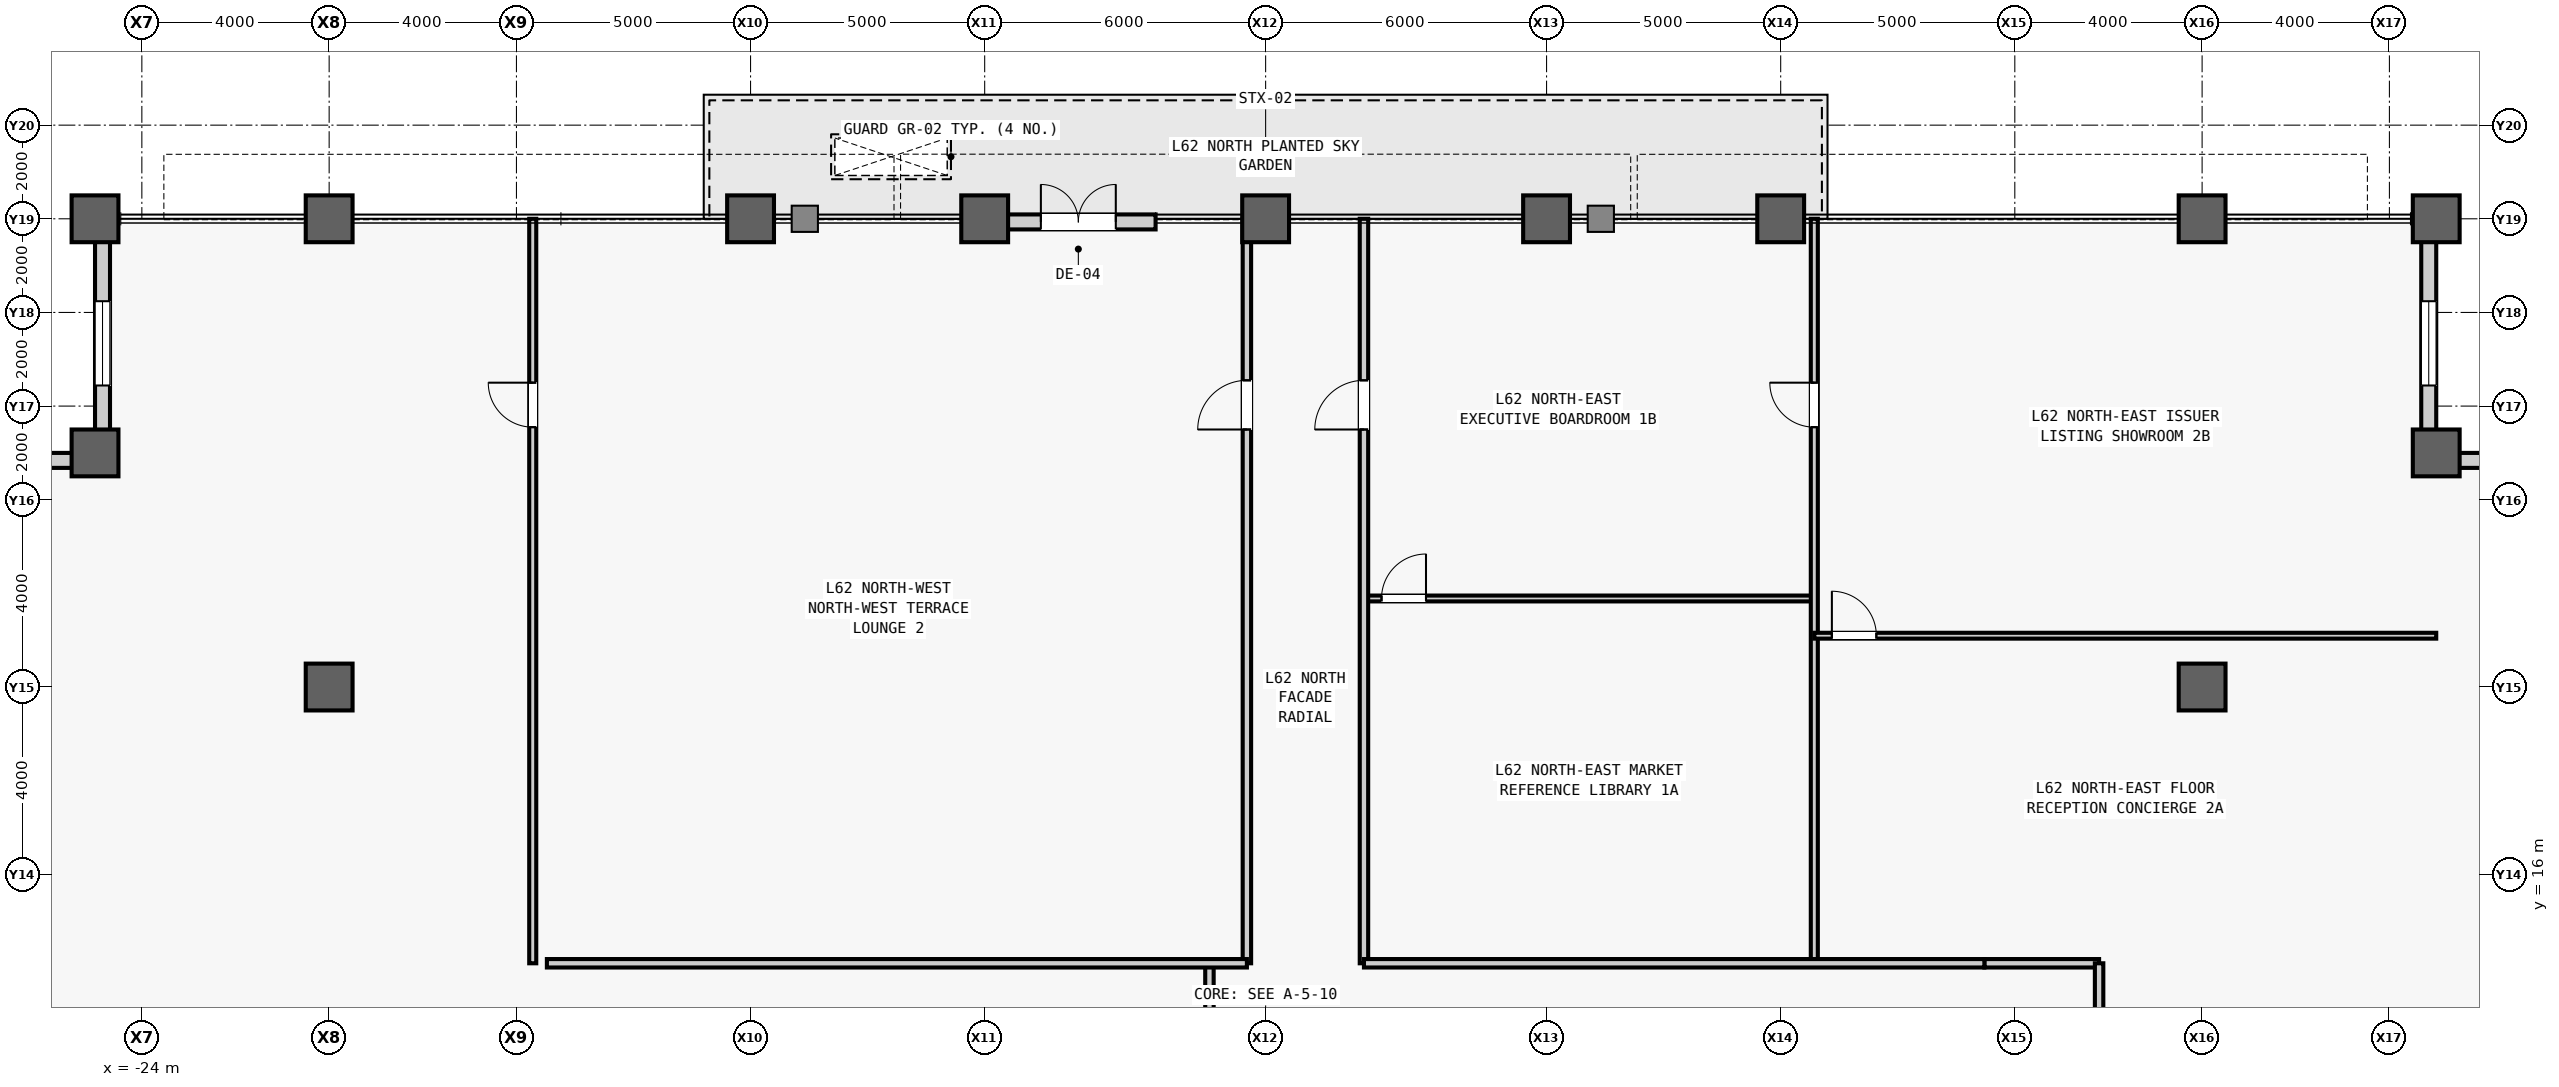
"""IFC4 building model, lengths in metres.
Left out: names, types, materials, properties, quantities, classifications, styles, units other than length and angle.
Written with IfcOpenShell. Run it as: python <this file> out.ifc"""

import sys

from ifc_helpers import new_model, si_unit, direction, frame, frame_2d, origin, origin_2d, place, context, subcontext, project, spatial, rectangle, hollow_rectangle, extrude, source, transform, mapped, element, fill, save


model = new_model("IFC4")
c1 = context("Model", 3, precision=1e-05, world=origin(), true_north=direction((0.0, 1.0)))
c2 = subcontext(c1, "Body", "Model", "MODEL_VIEW")
j1 = project(units=[si_unit("LENGTHUNIT", "METRE"), si_unit("PLANEANGLEUNIT", "RADIAN")], contexts=[c1])
p1 = place(None, origin())
s1 = spatial("IfcSite", under=j1, at=p1, CompositionType="ELEMENT")
p2 = place(p1, origin())
s2 = spatial("IfcBuilding", under=s1, at=p2, CompositionType="ELEMENT")
p3 = place(p2, frame((0.0, 0.0, 263.1)))
s3 = spatial("IfcBuildingStorey", under=s2, at=p3, CompositionType="ELEMENT", Elevation=263.1)
m1 = source(origin(), c2, "Body", "SweptSolid", [
    extrude(hollow_rectangle(XDim=1.0, YDim=1.0, WallThickness=0.055, at=origin_2d()), origin(), (0.0, 0.0, 1.0), 5.2),
])
for number, where, z_axis, x_axis in (
    (1, (-25.0, 25.0, 0.0), (0.0, 0.0, 1.0), (1.0, 0.0, 0.0)),
    (2, (-25.0, 30.0, 0.0), (0.0, 0.0, 1.0), (1.0, 0.0, 0.0)),
    (3, (-20.0, 20.0, 0.0), (0.0, 0.0, 1.0), (1.0, 0.0, 0.0)),
    (4, (-20.0, 30.0, 0.0), (0.0, 0.0, 1.0), (1.0, 0.0, 0.0)),
    (5, (-11.0, 30.0, 0.0), (0.0, 0.0, 1.0), (1.0, 0.0, 0.0)),
    (6, (-6.0, 30.0, 0.0), (0.0, 0.0, 1.0), (1.0, 0.0, 0.0)),
    (7, (0.0, 30.0, 0.0), (0.0, 0.0, 1.0), (1.0, 0.0, 0.0)),
    (8, (6.0, 30.0, 0.0), (0.0, 0.0, 1.0), (1.0, 0.0, 0.0)),
    (9, (11.0, 30.0, 0.0), (0.0, 0.0, 1.0), (1.0, 0.0, 0.0)),
    (10, (20.0, 20.0, 0.0), (0.0, 0.0, 1.0), (1.0, 0.0, 0.0)),
    (11, (20.0, 30.0, 0.0), (0.0, 0.0, 1.0), (1.0, 0.0, 0.0)),
    (12, (25.0, 25.0, 0.0), (0.0, 0.0, 1.0), (1.0, 0.0, 0.0)),
    (13, (25.0, 30.0, 0.0), (0.0, 0.0, 1.0), (1.0, 0.0, 0.0)),
):
    element("IfcColumn", number, at=place(p3, frame(where, z_axis=z_axis, x_axis=x_axis)), inside=s3, PredefinedType="COLUMN", context=c2, shape_type="MappedRepresentation", body=[
        mapped(m1, transform((0.0, 0.0, 0.0), scale=1.0)),
    ])
m2 = source(origin(), c2, "Body", "SweptSolid", [
    extrude(rectangle(XDim=4.68, YDim=0.32, at=frame_2d((2.34, 0.0))), origin(), (0.0, 0.0, 1.0), 3.984),
])
p4 = place(p3, frame((25.0, 24.84, 0.0), z_axis=(0.0, 0.0, 1.0), x_axis=(1.0, 0.0, 0.0)))
e14 = element("IfcWall", 14, at=p4, inside=s3, PredefinedType="STANDARD", context=c2, shape_type="MappedRepresentation", body=[
    mapped(m2, transform((0.0, 0.0, 0.0), scale=1.0)),
])
m3 = source(origin(), c2, "Body", "SweptSolid", [
    extrude(rectangle(XDim=1.8, YDim=2.4, at=frame_2d((0.9, 1.2))), frame((0.0, 0.17, 0.0), z_axis=(0.0, -1.0, 0.0), x_axis=(1.0, 0.0, 0.0)), (0.0, 0.0, 1.0), 0.34),
])
p5 = place(p4, frame((1.44, 0.0, 0.7)))
e15 = element("IfcOpeningElement", 15, at=p5, cuts=e14, PredefinedType="OPENING", context=c2, shape_type="MappedRepresentation", body=[
    mapped(m3, transform((0.0, 0.0, 0.0), scale=1.0)),
])
p6 = place(p3, frame((24.84, 25.0, 0.0), z_axis=(0.0, 0.0, 1.0), x_axis=(0.0, 1.0, 0.0)))
e16 = element("IfcWall", 16, at=p6, inside=s3, PredefinedType="STANDARD", context=c2, shape_type="MappedRepresentation", body=[
    mapped(m2, transform((0.0, 0.0, 0.0), scale=1.0)),
])
p7 = place(p6, frame((1.44, 0.0, 0.7)))
e17 = element("IfcOpeningElement", 17, at=p7, cuts=e16, PredefinedType="OPENING", context=c2, shape_type="MappedRepresentation", body=[
    mapped(m3, transform((0.0, 0.0, 0.0), scale=1.0)),
])
p8 = place(p3, frame((-24.84, 25.0, 0.0), z_axis=(0.0, 0.0, 1.0), x_axis=(0.0, 1.0, 0.0)))
e18 = element("IfcWall", 18, at=p8, inside=s3, PredefinedType="STANDARD", context=c2, shape_type="MappedRepresentation", body=[
    mapped(m2, transform((0.0, 0.0, 0.0), scale=1.0)),
])
p9 = place(p8, frame((1.44, 0.0, 0.7)))
e19 = element("IfcOpeningElement", 19, at=p9, cuts=e18, PredefinedType="OPENING", context=c2, shape_type="MappedRepresentation", body=[
    mapped(m3, transform((0.0, 0.0, 0.0), scale=1.0)),
])
p10 = place(p3, frame((-25.0, 24.84, 0.0), z_axis=(0.0, 0.0, 1.0), x_axis=(-1.0, 0.0, 0.0)))
e20 = element("IfcWall", 20, at=p10, inside=s3, PredefinedType="STANDARD", context=c2, shape_type="MappedRepresentation", body=[
    mapped(m2, transform((0.0, 0.0, 0.0), scale=1.0)),
])
p11 = place(p10, frame((1.44, 0.0, 0.7)))
e21 = element("IfcOpeningElement", 21, at=p11, cuts=e20, PredefinedType="OPENING", context=c2, shape_type="MappedRepresentation", body=[
    mapped(m3, transform((0.0, 0.0, 0.0), scale=1.0)),
])
m4 = source(origin(), c2, "Body", "SweptSolid", [
    extrude(rectangle(XDim=3.3, YDim=0.32, at=frame_2d((1.65, 0.0))), origin(), (0.0, 0.0, 1.0), 3.984),
])
p12 = place(p3, frame((-5.65, 29.933, 0.0), z_axis=(0.0, 0.0, 1.0), x_axis=(1.0, 0.0, 0.0)))
e22 = element("IfcWall", 22, at=p12, inside=s3, PredefinedType="STANDARD", context=c2, shape_type="MappedRepresentation", body=[
    mapped(m4, transform((0.0, 0.0, 0.0), scale=1.0)),
])
m5 = source(origin(), c2, "Body", "SweptSolid", [
    extrude(rectangle(XDim=1.6, YDim=2.25, at=frame_2d((0.8, 1.125))), frame((0.0, 0.17, 0.0), z_axis=(0.0, -1.0, 0.0), x_axis=(1.0, 0.0, 0.0)), (0.0, 0.0, 1.0), 0.34),
])
p13 = place(p12, frame((0.85, 0.0, 0.0)))
e23 = element("IfcOpeningElement", 23, at=p13, cuts=e22, PredefinedType="OPENING", context=c2, shape_type="MappedRepresentation", body=[
    mapped(m5, transform((0.0, 0.0, 0.0), scale=1.0)),
])
m6 = source(origin(), c2, "Body", "SweptSolid", [
    extrude(rectangle(XDim=2.45, YDim=0.18, at=frame_2d((1.225, 0.0))), origin(), (0.0, 0.0, 1.0), 4.6),
])
p14 = place(p3, frame((15.35, 14.1, 0.0), z_axis=(0.0, 0.0, 1.0), x_axis=(1.0, 0.0, 0.0)))
e24 = element("IfcWall", 24, at=p14, inside=s3, PredefinedType="PARTITIONING", context=c2, shape_type="MappedRepresentation", body=[
    mapped(m6, transform((0.0, 0.0, 0.0), scale=1.0)),
])
m7 = source(origin(), c2, "Body", "SweptSolid", [
    extrude(rectangle(XDim=3.1, YDim=0.18, at=frame_2d((1.55, 0.0))), origin(), (0.0, 0.0, 1.0), 4.6),
])
p15 = place(p3, frame((-1.2, 11.0, 0.0), z_axis=(0.0, 0.0, 1.0), x_axis=(0.0, 1.0, 0.0)))
e25 = element("IfcWall", 25, at=p15, inside=s3, PredefinedType="PARTITIONING", context=c2, shape_type="MappedRepresentation", body=[
    mapped(m7, transform((0.0, 0.0, 0.0), scale=1.0)),
])
m8 = source(origin(), c2, "Body", "SweptSolid", [
    extrude(rectangle(XDim=15.9, YDim=0.15, at=frame_2d((7.95, 0.0))), origin(), (0.0, 0.0, 1.0), 4.6),
])
p16 = place(p3, frame((-15.652, 14.1, 0.0), z_axis=(0.0, 0.0, 1.0), x_axis=(0.0, 1.0, 0.0)))
e26 = element("IfcWall", 26, at=p16, inside=s3, PredefinedType="PARTITIONING", context=c2, shape_type="MappedRepresentation", body=[
    mapped(m8, transform((0.0, 0.0, 0.0), scale=1.0)),
])
m9 = source(origin(), c2, "Body", "SweptSolid", [
    extrude(rectangle(XDim=0.95, YDim=2.15, at=frame_2d((0.475, 1.075))), frame((0.0, 0.085, 0.0), z_axis=(0.0, -1.0, 0.0), x_axis=(1.0, 0.0, 0.0)), (0.0, 0.0, 1.0), 0.17),
])
p17 = place(p16, frame((11.45, 0.0, 0.0)))
e27 = element("IfcOpeningElement", 27, at=p17, cuts=e26, PredefinedType="OPENING", context=c2, shape_type="MappedRepresentation", body=[
    mapped(m9, transform((0.0, 0.0, 0.0), scale=1.0)),
])
m10 = source(origin(), c2, "Body", "SweptSolid", [
    extrude(rectangle(XDim=15.9, YDim=0.18, at=frame_2d((7.95, 0.0))), origin(), (0.0, 0.0, 1.0), 2.8),
])
p18 = place(p3, frame((-0.4, 14.1, 0.0), z_axis=(0.0, 0.0, 1.0), x_axis=(0.0, 1.0, 0.0)))
e28 = element("IfcWall", 28, at=p18, inside=s3, PredefinedType="PARTITIONING", context=c2, shape_type="MappedRepresentation", body=[
    mapped(m10, transform((0.0, 0.0, 0.0), scale=1.0)),
])
m11 = source(origin(), c2, "Body", "SweptSolid", [
    extrude(rectangle(XDim=1.05, YDim=2.2, at=frame_2d((0.525, 1.1))), frame((0.0, 0.1, 0.0), z_axis=(0.0, -1.0, 0.0), x_axis=(1.0, 0.0, 0.0)), (0.0, 0.0, 1.0), 0.2),
])
p19 = place(p18, frame((11.4, 0.0, 0.0)))
e29 = element("IfcOpeningElement", 29, at=p19, cuts=e28, PredefinedType="OPENING", context=c2, shape_type="MappedRepresentation", body=[
    mapped(m11, transform((0.0, 0.0, 0.0), scale=1.0)),
])
m12 = source(origin(), c2, "Body", "SweptSolid", [
    extrude(rectangle(XDim=14.95, YDim=0.18, at=frame_2d((7.475, 0.0))), origin(), (0.0, 0.0, 1.0), 4.6),
])
p20 = place(p3, frame((-15.35, 14.1, 0.0), z_axis=(0.0, 0.0, 1.0), x_axis=(1.0, 0.0, 0.0)))
e30 = element("IfcWall", 30, at=p20, inside=s3, PredefinedType="PARTITIONING", context=c2, shape_type="MappedRepresentation", body=[
    mapped(m12, transform((0.0, 0.0, 0.0), scale=1.0)),
])
m13 = source(origin(), c2, "Body", "SweptSolid", [
    extrude(rectangle(XDim=9.618, YDim=0.125, at=frame_2d((4.809, 0.0))), origin(), (0.0, 0.0, 1.0), 4.6),
])
p21 = place(p3, frame((2.1, 21.891, 0.0), z_axis=(0.0, 0.0, 1.0), x_axis=(1.0, 0.0, 0.0)))
e31 = element("IfcWall", 31, at=p21, inside=s3, PredefinedType="PARTITIONING", context=c2, shape_type="MappedRepresentation", body=[
    mapped(m13, transform((0.0, 0.0, 0.0), scale=1.0)),
])
m14 = source(origin(), c2, "Body", "SweptSolid", [
    extrude(rectangle(XDim=0.95, YDim=2.15, at=frame_2d((0.475, 1.075))), frame((0.0, 0.073, 0.0), z_axis=(0.0, -1.0, 0.0), x_axis=(1.0, 0.0, 0.0)), (0.0, 0.0, 1.0), 0.145),
])
p22 = place(p21, frame((0.375, 0.0, 0.0)))
e32 = element("IfcOpeningElement", 32, at=p22, cuts=e31, PredefinedType="OPENING", context=c2, shape_type="MappedRepresentation", body=[
    mapped(m14, transform((0.0, 0.0, 0.0), scale=1.0)),
])
p23 = place(p3, frame((11.718, 14.1, 0.0), z_axis=(0.0, 0.0, 1.0), x_axis=(0.0, 1.0, 0.0)))
e33 = element("IfcWall", 33, at=p23, inside=s3, PredefinedType="PARTITIONING", context=c2, shape_type="MappedRepresentation", body=[
    mapped(m8, transform((0.0, 0.0, 0.0), scale=1.0)),
])
p24 = place(p23, frame((11.45, 0.0, 0.0)))
e34 = element("IfcOpeningElement", 34, at=p24, cuts=e33, PredefinedType="OPENING", context=c2, shape_type="MappedRepresentation", body=[
    mapped(m9, transform((0.0, 0.0, 0.0), scale=1.0)),
])
m15 = source(origin(), c2, "Body", "SweptSolid", [
    extrude(rectangle(XDim=13.282, YDim=0.125, at=frame_2d((6.641, 0.0))), origin(), (0.0, 0.0, 1.0), 4.6),
])
p25 = place(p3, frame((11.718, 21.096, 0.0), z_axis=(0.0, 0.0, 1.0), x_axis=(1.0, 0.0, 0.0)))
e35 = element("IfcWall", 35, at=p25, inside=s3, PredefinedType="PARTITIONING", context=c2, shape_type="MappedRepresentation", body=[
    mapped(m15, transform((0.0, 0.0, 0.0), scale=1.0)),
])
p26 = place(p25, frame((0.375, 0.0, 0.0)))
e36 = element("IfcOpeningElement", 36, at=p26, cuts=e35, PredefinedType="OPENING", context=c2, shape_type="MappedRepresentation", body=[
    mapped(m14, transform((0.0, 0.0, 0.0), scale=1.0)),
])
m16 = source(origin(), c2, "Body", "SweptSolid", [
    extrude(rectangle(XDim=15.9, YDim=0.18, at=frame_2d((7.95, 0.0))), origin(), (0.0, 0.0, 1.0), 4.6),
])
p27 = place(p3, frame((2.1, 14.1, 0.0), z_axis=(0.0, 0.0, 1.0), x_axis=(0.0, 1.0, 0.0)))
e37 = element("IfcWall", 37, at=p27, inside=s3, PredefinedType="PARTITIONING", context=c2, shape_type="MappedRepresentation", body=[
    mapped(m16, transform((0.0, 0.0, 0.0), scale=1.0)),
])
p28 = place(p27, frame((11.4, 0.0, 0.0)))
e38 = element("IfcOpeningElement", 38, at=p28, cuts=e37, PredefinedType="OPENING", context=c2, shape_type="MappedRepresentation", body=[
    mapped(m11, transform((0.0, 0.0, 0.0), scale=1.0)),
])
m17 = source(origin(), c2, "Body", "SweptSolid", [
    extrude(rectangle(XDim=13.25, YDim=0.18, at=frame_2d((6.625, 0.0))), origin(), (0.0, 0.0, 1.0), 4.6),
])
p29 = place(p3, frame((2.1, 14.1, 0.0), z_axis=(0.0, 0.0, 1.0), x_axis=(1.0, 0.0, 0.0)))
e39 = element("IfcWall", 39, at=p29, inside=s3, PredefinedType="PARTITIONING", context=c2, shape_type="MappedRepresentation", body=[
    mapped(m17, transform((0.0, 0.0, 0.0), scale=1.0)),
])
m18 = source(origin(), c2, "Body", "SweptSolid", [
    extrude(rectangle(XDim=16.3, YDim=0.18, at=frame_2d((8.15, 0.0))), origin(), (0.0, 0.0, 1.0), 4.6),
])
p30 = place(p3, frame((17.8, -2.2, 0.0), z_axis=(0.0, 0.0, 1.0), x_axis=(0.0, 1.0, 0.0)))
e40 = element("IfcWall", 40, at=p30, inside=s3, PredefinedType="PARTITIONING", context=c2, shape_type="MappedRepresentation", body=[
    mapped(m18, transform((0.0, 0.0, 0.0), scale=1.0)),
])
m19 = source(origin(), c2, "Body", "SweptSolid", [
    extrude(rectangle(XDim=1.8, YDim=2.4, at=frame_2d((0.9, 1.2))), frame((0.0, 0.03, 0.0), z_axis=(0.0, -1.0, 0.0), x_axis=(1.0, 0.0, 0.0)), (0.0, 0.0, 1.0), 0.06),
])
p31 = place(p7, origin())
e41 = element("IfcWindow", 41, at=p31, inside=s3, PartitioningType="SINGLE_PANEL", PredefinedType="WINDOW", context=c2, shape_type="MappedRepresentation", body=[
    mapped(m19, transform((0.0, 0.0, 0.0), scale=1.0)),
])
fill(e17, e41)
p32 = place(p9, origin())
e42 = element("IfcWindow", 42, at=p32, inside=s3, PartitioningType="SINGLE_PANEL", PredefinedType="WINDOW", context=c2, shape_type="MappedRepresentation", body=[
    mapped(m19, transform((0.0, 0.0, 0.0), scale=1.0)),
])
fill(e19, e42)
m20 = source(origin(), c2, "Body", "SweptSolid", [
    extrude(rectangle(XDim=1.6, YDim=2.25, at=frame_2d((0.8, 1.125))), frame((0.0, 0.025, 0.0), z_axis=(0.0, -1.0, 0.0), x_axis=(1.0, 0.0, 0.0)), (0.0, 0.0, 1.0), 0.05),
])
p33 = place(p13, origin())
e43 = element("IfcDoor", 43, at=p33, inside=s3, OperationType="DOUBLE_DOOR_SINGLE_SWING", PredefinedType="DOOR", context=c2, shape_type="MappedRepresentation", body=[
    mapped(m20, transform((0.0, 0.0, 0.0), scale=1.0)),
])
fill(e23, e43)
m21 = source(origin(), c2, "Body", "SweptSolid", [
    extrude(rectangle(XDim=0.95, YDim=2.15, at=frame_2d((0.475, 1.075))), frame((0.0, 0.025, 0.0), z_axis=(0.0, -1.0, 0.0), x_axis=(1.0, 0.0, 0.0)), (0.0, 0.0, 1.0), 0.05),
])
p34 = place(p17, origin())
e44 = element("IfcDoor", 44, at=p34, inside=s3, OperationType="SINGLE_SWING_RIGHT", PredefinedType="DOOR", context=c2, shape_type="MappedRepresentation", body=[
    mapped(m21, transform((0.0, 0.0, 0.0), scale=1.0)),
])
fill(e27, e44)
m22 = source(origin(), c2, "Body", "SweptSolid", [
    extrude(rectangle(XDim=1.05, YDim=2.2, at=frame_2d((0.525, 1.1))), frame((0.0, 0.025, 0.0), z_axis=(0.0, -1.0, 0.0), x_axis=(1.0, 0.0, 0.0)), (0.0, 0.0, 1.0), 0.05),
])
p35 = place(p19, origin())
e45 = element("IfcDoor", 45, at=p35, inside=s3, OperationType="SINGLE_SWING_LEFT", PredefinedType="DOOR", context=c2, shape_type="MappedRepresentation", body=[
    mapped(m22, transform((0.0, 0.0, 0.0), scale=1.0)),
])
fill(e29, e45)
p36 = place(p22, origin())
e46 = element("IfcDoor", 46, at=p36, inside=s3, OperationType="SINGLE_SWING_RIGHT", PredefinedType="DOOR", context=c2, shape_type="MappedRepresentation", body=[
    mapped(m21, transform((0.0, 0.0, 0.0), scale=1.0)),
])
fill(e32, e46)
p37 = place(p24, origin())
e47 = element("IfcDoor", 47, at=p37, inside=s3, OperationType="SINGLE_SWING_RIGHT", PredefinedType="DOOR", context=c2, shape_type="MappedRepresentation", body=[
    mapped(m21, transform((0.0, 0.0, 0.0), scale=1.0)),
])
fill(e34, e47)
p38 = place(p26, origin())
e48 = element("IfcDoor", 48, at=p38, inside=s3, OperationType="SINGLE_SWING_LEFT", PredefinedType="DOOR", context=c2, shape_type="MappedRepresentation", body=[
    mapped(m21, transform((0.0, 0.0, 0.0), scale=1.0)),
])
fill(e36, e48)
p39 = place(p28, origin())
e49 = element("IfcDoor", 49, at=p39, inside=s3, OperationType="SINGLE_SWING_LEFT", PredefinedType="DOOR", context=c2, shape_type="MappedRepresentation", body=[
    mapped(m22, transform((0.0, 0.0, 0.0), scale=1.0)),
])
fill(e38, e49)
save(model, sys.argv[1])
